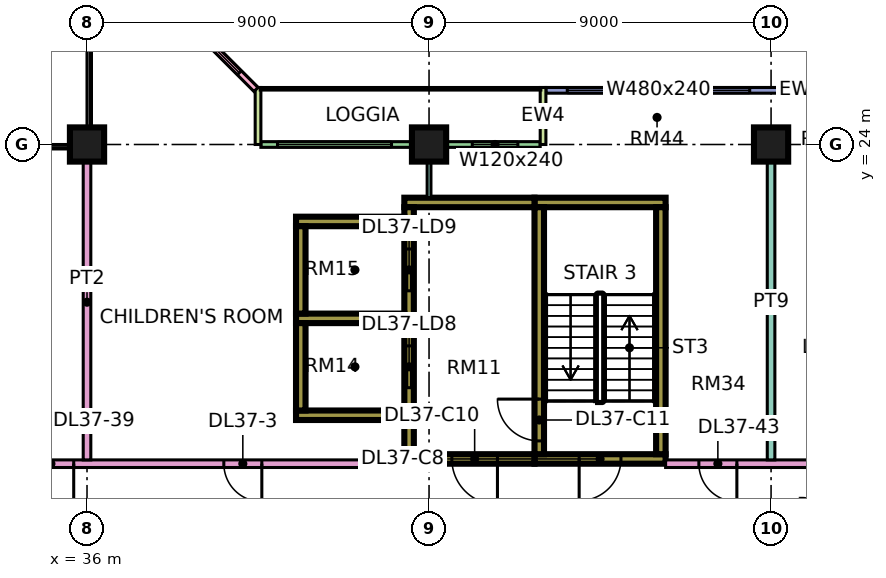
"""IFC4 building model, lengths in metres.
Left out: names, types, materials, properties, quantities, classifications, styles, units other than length and angle.
Written with IfcOpenShell. Run it as: python <this file> out.ifc"""

import sys

from ifc_helpers import new_model, si_unit, direction, frame, frame_2d, origin, origin_2d, place, context, subcontext, project, spatial, rectangle, extrude, element, fill, save


model = new_model("IFC4")
c1 = context("Model", 3, precision=1e-05, world=origin(), true_north=direction((0.0, 1.0)))
c2 = subcontext(c1, "Body", "Model", "MODEL_VIEW")
j1 = project(units=[si_unit("LENGTHUNIT", "METRE"), si_unit("PLANEANGLEUNIT", "RADIAN")], contexts=[c1])
p1 = place(None, origin())
s1 = spatial("IfcSite", under=j1, at=p1, CompositionType="ELEMENT")
p2 = place(p1, origin())
s2 = spatial("IfcBuilding", under=s1, at=p2, CompositionType="ELEMENT")
p3 = place(p2, frame((0.0, 0.0, 164.9)))
s3 = spatial("IfcBuildingStorey", under=s2, at=p3, CompositionType="ELEMENT", Elevation=164.9)
for number, where, z_axis, x_axis in (
    (1, (36.0, 24.0, 0.0), (0.0, 0.0, 1.0), (1.0, 0.0, 0.0)),
    (2, (45.0, 24.0, 0.0), (0.0, 0.0, 1.0), (1.0, 0.0, 0.0)),
    (3, (54.0, 24.0, 0.0), (0.0, 0.0, 1.0), (1.0, 0.0, 0.0)),
):
    element("IfcColumn", number, at=place(p3, frame(where, z_axis=z_axis, x_axis=x_axis)), inside=s3, PredefinedType="COLUMN", context=c2, shape_type="SweptSolid", body=[
        extrude(rectangle(XDim=0.9, YDim=0.9, at=origin_2d()), origin(), (0.0, 0.0, 1.0), 3.75),
    ])
p4 = place(p3, frame((47.775, 15.725, 0.0), z_axis=(0.0, 0.0, 1.0), x_axis=(1.0, 0.0, 0.0)))
e4 = element("IfcWall", 4, at=p4, inside=s3, PredefinedType="SHEAR", context=c2, shape_type="SweptSolid", body=[
    extrude(rectangle(XDim=3.45, YDim=0.25, at=frame_2d((1.725, 0.0))), origin(), (0.0, 0.0, 1.0), 3.75),
])
p5 = place(p4, frame((1.175, 0.0, 0.0)))
e5 = element("IfcOpeningElement", 5, at=p5, cuts=e4, PredefinedType="OPENING", context=c2, shape_type="SweptSolid", body=[
    extrude(rectangle(XDim=1.1, YDim=2.2, at=frame_2d((0.55, 1.1))), frame((0.0, 0.135, 0.0), z_axis=(0.0, -1.0, 0.0), x_axis=(1.0, 0.0, 0.0)), (0.0, 0.0, 1.0), 0.27),
])
p6 = place(p3, frame((47.775, 22.475, 0.0), z_axis=(0.0, 0.0, 1.0), x_axis=(1.0, 0.0, 0.0)))
e6 = element("IfcWall", 6, at=p6, inside=s3, PredefinedType="SHEAR", context=c2, shape_type="SweptSolid", body=[
    extrude(rectangle(XDim=3.45, YDim=0.25, at=frame_2d((1.725, 0.0))), origin(), (0.0, 0.0, 1.0), 3.75),
])
p7 = place(p3, frame((47.9, 15.85, 0.0), z_axis=(0.0, 0.0, 1.0), x_axis=(0.0, 1.0, 0.0)))
e7 = element("IfcWall", 7, at=p7, inside=s3, PredefinedType="SHEAR", context=c2, shape_type="SweptSolid", body=[
    extrude(rectangle(XDim=6.5, YDim=0.25, at=frame_2d((3.25, 0.0))), origin(), (0.0, 0.0, 1.0), 3.75),
])
p8 = place(p7, frame((0.35, 0.0, 0.0)))
e8 = element("IfcOpeningElement", 8, at=p8, cuts=e7, PredefinedType="OPENING", context=c2, shape_type="SweptSolid", body=[
    extrude(rectangle(XDim=1.1, YDim=2.2, at=frame_2d((0.55, 1.1))), frame((0.0, 0.135, 0.0), z_axis=(0.0, -1.0, 0.0), x_axis=(1.0, 0.0, 0.0)), (0.0, 0.0, 1.0), 0.27),
])
p9 = place(p3, frame((51.1, 15.85, 0.0), z_axis=(0.0, 0.0, 1.0), x_axis=(0.0, 1.0, 0.0)))
e9 = element("IfcWall", 9, at=p9, inside=s3, PredefinedType="SHEAR", context=c2, shape_type="SweptSolid", body=[
    extrude(rectangle(XDim=6.5, YDim=0.25, at=frame_2d((3.25, 0.0))), origin(), (0.0, 0.0, 1.0), 3.75),
])
p10 = place(p3, frame((44.35, 15.725, 0.0), z_axis=(0.0, 0.0, 1.0), x_axis=(1.0, 0.0, 0.0)))
e10 = element("IfcWall", 10, at=p10, inside=s3, PredefinedType="SHEAR", context=c2, shape_type="SweptSolid", body=[
    extrude(rectangle(XDim=3.425, YDim=0.25, at=frame_2d((1.712, 0.0))), origin(), (0.0, 0.0, 1.0), 3.75),
])
p11 = place(p10, frame((1.25, 0.0, 0.0)))
e11 = element("IfcOpeningElement", 11, at=p11, cuts=e10, PredefinedType="OPENING", context=c2, shape_type="SweptSolid", body=[
    extrude(rectangle(XDim=1.2, YDim=2.2, at=frame_2d((0.6, 1.1))), frame((0.0, 0.135, 0.0), z_axis=(0.0, -1.0, 0.0), x_axis=(1.0, 0.0, 0.0)), (0.0, 0.0, 1.0), 0.27),
])
p12 = place(p3, frame((44.35, 22.475, 0.0), z_axis=(0.0, 0.0, 1.0), x_axis=(1.0, 0.0, 0.0)))
e12 = element("IfcWall", 12, at=p12, inside=s3, PredefinedType="SHEAR", context=c2, shape_type="SweptSolid", body=[
    extrude(rectangle(XDim=3.425, YDim=0.25, at=frame_2d((1.712, 0.0))), origin(), (0.0, 0.0, 1.0), 3.75),
])
p13 = place(p3, frame((44.475, 15.85, 0.0), z_axis=(0.0, 0.0, 1.0), x_axis=(0.0, 1.0, 0.0)))
e13 = element("IfcWall", 13, at=p13, inside=s3, PredefinedType="SHEAR", context=c2, shape_type="SweptSolid", body=[
    extrude(rectangle(XDim=6.5, YDim=0.25, at=frame_2d((3.25, 0.0))), origin(), (0.0, 0.0, 1.0), 3.75),
])
p14 = place(p13, frame((1.75, 0.0, 0.0)))
e14 = element("IfcOpeningElement", 14, at=p14, cuts=e13, PredefinedType="OPENING", context=c2, shape_type="SweptSolid", body=[
    extrude(rectangle(XDim=1.1, YDim=2.2, at=frame_2d((0.55, 1.1))), frame((0.0, 0.135, 0.0), z_axis=(0.0, -1.0, 0.0), x_axis=(1.0, 0.0, 0.0)), (0.0, 0.0, 1.0), 0.27),
])
p15 = place(p13, frame((4.3, 0.0, 0.0)))
e15 = element("IfcOpeningElement", 15, at=p15, cuts=e13, PredefinedType="OPENING", context=c2, shape_type="SweptSolid", body=[
    extrude(rectangle(XDim=1.1, YDim=2.2, at=frame_2d((0.55, 1.1))), frame((0.0, 0.135, 0.0), z_axis=(0.0, -1.0, 0.0), x_axis=(1.0, 0.0, 0.0)), (0.0, 0.0, 1.0), 0.27),
])
for number, where, z_axis, x_axis in (
    (16, (41.5, 16.875, 0.0), (0.0, 0.0, 1.0), (1.0, 0.0, 0.0)),
    (17, (41.5, 19.425, 0.0), (0.0, 0.0, 1.0), (1.0, 0.0, 0.0)),
    (18, (41.5, 21.975, 0.0), (0.0, 0.0, 1.0), (1.0, 0.0, 0.0)),
):
    element("IfcWall", number, at=place(p3, frame(where, z_axis=z_axis, x_axis=x_axis)), inside=s3, PredefinedType="SHEAR", context=c2, shape_type="SweptSolid", body=[
        extrude(rectangle(XDim=2.85, YDim=0.25, at=frame_2d((1.425, 0.0))), origin(), (0.0, 0.0, 1.0), 3.75),
    ])
for number, where, z_axis, x_axis in (
    (19, (41.625, 17.0, 0.0), (0.0, 0.0, 1.0), (0.0, 1.0, 0.0)),
    (20, (41.625, 19.55, 0.0), (0.0, 0.0, 1.0), (0.0, 1.0, 0.0)),
):
    element("IfcWall", number, at=place(p3, frame(where, z_axis=z_axis, x_axis=x_axis)), inside=s3, PredefinedType="SHEAR", context=c2, shape_type="SweptSolid", body=[
        extrude(rectangle(XDim=2.3, YDim=0.25, at=frame_2d((1.15, 0.0))), origin(), (0.0, 0.0, 1.0), 3.75),
    ])
p16 = place(p3, frame((61.5, 25.425, 0.0), z_axis=(0.0, 0.0, 1.0), x_axis=(-1.0, 0.0, 0.0)))
e21 = element("IfcWall", 21, at=p16, inside=s3, PredefinedType="SOLIDWALL", context=c2, shape_type="SweptSolid", body=[
    extrude(rectangle(XDim=13.425, YDim=0.15, at=frame_2d((6.712, 0.0))), origin(), (0.0, 0.0, 1.0), 3.35),
])
p17 = place(p16, frame((0.3, 0.0, 0.45)))
e22 = element("IfcOpeningElement", 22, at=p17, cuts=e21, PredefinedType="OPENING", context=c2, shape_type="SweptSolid", body=[
    extrude(rectangle(XDim=0.9, YDim=2.4, at=frame_2d((0.45, 1.2))), frame((0.0, 0.085, 0.0), z_axis=(0.0, -1.0, 0.0), x_axis=(1.0, 0.0, 0.0)), (0.0, 0.0, 1.0), 0.17),
])
p18 = place(p16, frame((2.1, 0.0, 0.45)))
e23 = element("IfcOpeningElement", 23, at=p18, cuts=e21, PredefinedType="OPENING", context=c2, shape_type="SweptSolid", body=[
    extrude(rectangle(XDim=1.8, YDim=2.4, at=frame_2d((0.9, 1.2))), frame((0.0, 0.085, 0.0), z_axis=(0.0, -1.0, 0.0), x_axis=(1.0, 0.0, 0.0)), (0.0, 0.0, 1.0), 0.17),
])
p19 = place(p16, frame((5.1, 0.0, 0.45)))
e24 = element("IfcOpeningElement", 24, at=p19, cuts=e21, PredefinedType="OPENING", context=c2, shape_type="SweptSolid", body=[
    extrude(rectangle(XDim=1.8, YDim=2.4, at=frame_2d((0.9, 1.2))), frame((0.0, 0.085, 0.0), z_axis=(0.0, -1.0, 0.0), x_axis=(1.0, 0.0, 0.0)), (0.0, 0.0, 1.0), 0.17),
])
p20 = place(p16, frame((8.062, 0.0, 0.45)))
e25 = element("IfcOpeningElement", 25, at=p20, cuts=e21, PredefinedType="OPENING", context=c2, shape_type="SweptSolid", body=[
    extrude(rectangle(XDim=4.8, YDim=2.4, at=frame_2d((2.4, 1.2))), frame((0.0, 0.085, 0.0), z_axis=(0.0, -1.0, 0.0), x_axis=(1.0, 0.0, 0.0)), (0.0, 0.0, 1.0), 0.17),
])
p21 = place(p3, frame((47.925, 24.0, 0.0), z_axis=(0.0, 0.0, 1.0), x_axis=(-1.0, 0.0, 0.0)))
e26 = element("IfcWall", 26, at=p21, inside=s3, PredefinedType="SOLIDWALL", context=c2, shape_type="SweptSolid", body=[
    extrude(rectangle(XDim=7.35, YDim=0.15, at=frame_2d((3.675, 0.0))), origin(), (0.0, 0.0, 1.0), 3.35),
])
p22 = place(p21, frame((0.587, 0.0, 0.45)))
e27 = element("IfcOpeningElement", 27, at=p22, cuts=e26, PredefinedType="OPENING", context=c2, shape_type="SweptSolid", body=[
    extrude(rectangle(XDim=1.2, YDim=2.4, at=frame_2d((0.6, 1.2))), frame((0.0, 0.085, 0.0), z_axis=(0.0, -1.0, 0.0), x_axis=(1.0, 0.0, 0.0)), (0.0, 0.0, 1.0), 0.17),
])
p23 = place(p21, frame((3.913, 0.0, 0.45)))
e28 = element("IfcOpeningElement", 28, at=p23, cuts=e26, PredefinedType="OPENING", context=c2, shape_type="SweptSolid", body=[
    extrude(rectangle(XDim=3.0, YDim=2.4, at=frame_2d((1.5, 1.2))), frame((0.0, 0.085, 0.0), z_axis=(0.0, -1.0, 0.0), x_axis=(1.0, 0.0, 0.0)), (0.0, 0.0, 1.0), 0.17),
])
for number, where, z_axis, x_axis in (
    (29, (48.0, 25.5, 0.0), (0.0, 0.0, 1.0), (0.0, -1.0, 0.0)),
    (30, (40.5, 25.5, 0.0), (0.0, 0.0, 1.0), (0.0, -1.0, 0.0)),
):
    element("IfcWall", number, at=place(p3, frame(where, z_axis=z_axis, x_axis=x_axis)), inside=s3, PredefinedType="SOLIDWALL", context=c2, shape_type="SweptSolid", body=[
        extrude(rectangle(XDim=1.5, YDim=0.15, at=frame_2d((0.75, 0.0))), origin(), (0.0, 0.0, 1.0), 3.35),
    ])
p24 = place(p3, frame((40.447, 25.447, 0.0), z_axis=(0.0, 0.0, 1.0), x_axis=(-0.707106781187, 0.707106781187, 0.0)))
e31 = element("IfcWall", 31, at=p24, inside=s3, PredefinedType="SOLIDWALL", context=c2, shape_type="SweptSolid", body=[
    extrude(rectangle(XDim=4.243, YDim=0.15, at=frame_2d((2.121, 0.0))), origin(), (0.0, 0.0, 1.0), 3.35),
])
p25 = place(p24, frame((0.621, 0.0, 0.45)))
e32 = element("IfcOpeningElement", 32, at=p25, cuts=e31, PredefinedType="OPENING", context=c2, shape_type="SweptSolid", body=[
    extrude(rectangle(XDim=3.0, YDim=2.4, at=frame_2d((1.5, 1.2))), frame((0.0, 0.085, 0.0), z_axis=(0.0, -1.0, 0.0), x_axis=(1.0, 0.0, 0.0)), (0.0, 0.0, 1.0), 0.17),
])
p26 = place(p3, frame((34.0, 15.6, 0.0), z_axis=(0.0, 0.0, 1.0), x_axis=(1.0, 0.0, 0.0)))
e33 = element("IfcWall", 33, at=p26, inside=s3, PredefinedType="PARTITIONING", context=c2, shape_type="SweptSolid", body=[
    extrude(rectangle(XDim=10.35, YDim=0.2, at=frame_2d((5.175, 0.0))), origin(), (0.0, 0.0, 1.0), 3.35),
])
p27 = place(p26, frame((5.6, 0.0, 0.0)))
e34 = element("IfcOpeningElement", 34, at=p27, cuts=e33, PredefinedType="OPENING", context=c2, shape_type="SweptSolid", body=[
    extrude(rectangle(XDim=1.0, YDim=2.1, at=frame_2d((0.5, 1.05))), frame((0.0, 0.11, 0.0), z_axis=(0.0, -1.0, 0.0), x_axis=(1.0, 0.0, 0.0)), (0.0, 0.0, 1.0), 0.22),
])
p28 = place(p26, frame((0.45, 0.0, 0.0)))
e35 = element("IfcOpeningElement", 35, at=p28, cuts=e33, PredefinedType="OPENING", context=c2, shape_type="SweptSolid", body=[
    extrude(rectangle(XDim=1.2, YDim=2.1, at=frame_2d((0.6, 1.05))), frame((0.0, 0.11, 0.0), z_axis=(0.0, -1.0, 0.0), x_axis=(1.0, 0.0, 0.0)), (0.0, 0.0, 1.0), 0.22),
])
p29 = place(p3, frame((36.0, 15.7, 0.0), z_axis=(0.0, 0.0, 1.0), x_axis=(0.0, 1.0, 0.0)))
e36 = element("IfcWall", 36, at=p29, inside=s3, PredefinedType="PARTITIONING", context=c2, shape_type="SweptSolid", body=[
    extrude(rectangle(XDim=8.3, YDim=0.2, at=frame_2d((4.15, 0.0))), origin(), (0.0, 0.0, 1.0), 3.35),
])
p30 = place(p3, frame((45.0, 22.6, 0.0), z_axis=(0.0, 0.0, 1.0), x_axis=(0.0, 1.0, 0.0)))
e37 = element("IfcWall", 37, at=p30, inside=s3, PredefinedType="PARTITIONING", context=c2, shape_type="SweptSolid", body=[
    extrude(rectangle(XDim=1.326, YDim=0.1, at=frame_2d((0.663, 0.0))), origin(), (0.0, 0.0, 1.0), 3.35),
])
p31 = place(p3, frame((51.225, 15.6, 0.0), z_axis=(0.0, 0.0, 1.0), x_axis=(1.0, 0.0, 0.0)))
e38 = element("IfcWall", 38, at=p31, inside=s3, PredefinedType="PARTITIONING", context=c2, shape_type="SweptSolid", body=[
    extrude(rectangle(XDim=11.701, YDim=0.2, at=frame_2d((5.851, 0.0))), origin(), (0.0, 0.0, 1.0), 3.35),
])
p32 = place(p31, frame((3.875, 0.0, 0.0)))
e39 = element("IfcOpeningElement", 39, at=p32, cuts=e38, PredefinedType="OPENING", context=c2, shape_type="SweptSolid", body=[
    extrude(rectangle(XDim=1.0, YDim=2.1, at=frame_2d((0.5, 1.05))), frame((0.0, 0.11, 0.0), z_axis=(0.0, -1.0, 0.0), x_axis=(1.0, 0.0, 0.0)), (0.0, 0.0, 1.0), 0.22),
])
p33 = place(p31, frame((0.875, 0.0, 0.0)))
e40 = element("IfcOpeningElement", 40, at=p33, cuts=e38, PredefinedType="OPENING", context=c2, shape_type="SweptSolid", body=[
    extrude(rectangle(XDim=1.0, YDim=2.1, at=frame_2d((0.5, 1.05))), frame((0.0, 0.11, 0.0), z_axis=(0.0, -1.0, 0.0), x_axis=(1.0, 0.0, 0.0)), (0.0, 0.0, 1.0), 0.22),
])
p34 = place(p3, frame((54.0, 15.7, 0.0), z_axis=(0.0, 0.0, 1.0), x_axis=(0.0, 1.0, 0.0)))
e41 = element("IfcWall", 41, at=p34, inside=s3, PredefinedType="PARTITIONING", context=c2, shape_type="SweptSolid", body=[
    extrude(rectangle(XDim=8.3, YDim=0.2, at=frame_2d((4.15, 0.0))), origin(), (0.0, 0.0, 1.0), 3.35),
])
p35 = place(p19, origin())
e42 = element("IfcWindow", 42, at=p35, inside=s3, PartitioningType="SINGLE_PANEL", PredefinedType="WINDOW", context=c2, shape_type="SweptSolid", body=[
    extrude(rectangle(XDim=1.8, YDim=2.4, at=frame_2d((0.9, 1.2))), frame((0.0, 0.03, 0.0), z_axis=(0.0, -1.0, 0.0), x_axis=(1.0, 0.0, 0.0)), (0.0, 0.0, 1.0), 0.06),
])
fill(e24, e42)
p36 = place(p20, origin())
e43 = element("IfcWindow", 43, at=p36, inside=s3, PartitioningType="SINGLE_PANEL", PredefinedType="WINDOW", context=c2, shape_type="SweptSolid", body=[
    extrude(rectangle(XDim=4.8, YDim=2.4, at=frame_2d((2.4, 1.2))), frame((0.0, 0.03, 0.0), z_axis=(0.0, -1.0, 0.0), x_axis=(1.0, 0.0, 0.0)), (0.0, 0.0, 1.0), 0.06),
])
fill(e25, e43)
p37 = place(p22, origin())
e44 = element("IfcWindow", 44, at=p37, inside=s3, PartitioningType="SINGLE_PANEL", PredefinedType="WINDOW", context=c2, shape_type="SweptSolid", body=[
    extrude(rectangle(XDim=1.2, YDim=2.4, at=frame_2d((0.6, 1.2))), frame((0.0, 0.03, 0.0), z_axis=(0.0, -1.0, 0.0), x_axis=(1.0, 0.0, 0.0)), (0.0, 0.0, 1.0), 0.06),
])
fill(e27, e44)
p38 = place(p23, origin())
e45 = element("IfcWindow", 45, at=p38, inside=s3, PartitioningType="SINGLE_PANEL", PredefinedType="WINDOW", context=c2, shape_type="SweptSolid", body=[
    extrude(rectangle(XDim=3.0, YDim=2.4, at=frame_2d((1.5, 1.2))), frame((0.0, 0.03, 0.0), z_axis=(0.0, -1.0, 0.0), x_axis=(1.0, 0.0, 0.0)), (0.0, 0.0, 1.0), 0.06),
])
fill(e28, e45)
p39 = place(p25, origin())
e46 = element("IfcWindow", 46, at=p39, inside=s3, PartitioningType="SINGLE_PANEL", PredefinedType="WINDOW", context=c2, shape_type="SweptSolid", body=[
    extrude(rectangle(XDim=3.0, YDim=2.4, at=frame_2d((1.5, 1.2))), frame((0.0, 0.03, 0.0), z_axis=(0.0, -1.0, 0.0), x_axis=(1.0, 0.0, 0.0)), (0.0, 0.0, 1.0), 0.06),
])
fill(e32, e46)
p40 = place(p5, frame((1.1, 0.0, 0.0), z_axis=(0.0, 0.0, 1.0), x_axis=(-1.0, 0.0, 0.0)))
e47 = element("IfcDoor", 47, at=p40, inside=s3, OperationType="SINGLE_SWING_LEFT", PredefinedType="DOOR", context=c2, shape_type="SweptSolid", body=[
    extrude(rectangle(XDim=1.1, YDim=2.2, at=frame_2d((0.55, 1.1))), frame((0.0, 0.025, 0.0), z_axis=(0.0, -1.0, 0.0), x_axis=(1.0, 0.0, 0.0)), (0.0, 0.0, 1.0), 0.05),
])
fill(e5, e47)
p41 = place(p11, origin())
e48 = element("IfcDoor", 48, at=p41, inside=s3, OperationType="SINGLE_SWING_RIGHT", PredefinedType="DOOR", context=c2, shape_type="SweptSolid", body=[
    extrude(rectangle(XDim=1.2, YDim=2.2, at=frame_2d((0.6, 1.1))), frame((0.0, 0.025, 0.0), z_axis=(0.0, -1.0, 0.0), x_axis=(1.0, 0.0, 0.0)), (0.0, 0.0, 1.0), 0.05),
])
fill(e11, e48)
p42 = place(p8, frame((1.1, 0.0, 0.0), z_axis=(0.0, 0.0, 1.0), x_axis=(-1.0, 0.0, 0.0)))
e49 = element("IfcDoor", 49, at=p42, inside=s3, OperationType="SINGLE_SWING_RIGHT", PredefinedType="DOOR", context=c2, shape_type="SweptSolid", body=[
    extrude(rectangle(XDim=1.1, YDim=2.2, at=frame_2d((0.55, 1.1))), frame((0.0, 0.025, 0.0), z_axis=(0.0, -1.0, 0.0), x_axis=(1.0, 0.0, 0.0)), (0.0, 0.0, 1.0), 0.05),
])
fill(e8, e49)
p43 = place(p14, origin())
e50 = element("IfcDoor", 50, at=p43, inside=s3, OperationType="DOUBLE_DOOR_SLIDING", PredefinedType="DOOR", context=c2, shape_type="SweptSolid", body=[
    extrude(rectangle(XDim=1.1, YDim=2.2, at=frame_2d((0.55, 1.1))), frame((0.0, 0.025, 0.0), z_axis=(0.0, -1.0, 0.0), x_axis=(1.0, 0.0, 0.0)), (0.0, 0.0, 1.0), 0.05),
])
fill(e14, e50)
p44 = place(p15, origin())
e51 = element("IfcDoor", 51, at=p44, inside=s3, OperationType="DOUBLE_DOOR_SLIDING", PredefinedType="DOOR", context=c2, shape_type="SweptSolid", body=[
    extrude(rectangle(XDim=1.1, YDim=2.2, at=frame_2d((0.55, 1.1))), frame((0.0, 0.025, 0.0), z_axis=(0.0, -1.0, 0.0), x_axis=(1.0, 0.0, 0.0)), (0.0, 0.0, 1.0), 0.05),
])
fill(e15, e51)
p45 = place(p27, origin())
e52 = element("IfcDoor", 52, at=p45, inside=s3, OperationType="SINGLE_SWING_RIGHT", PredefinedType="DOOR", context=c2, shape_type="SweptSolid", body=[
    extrude(rectangle(XDim=1.0, YDim=2.1, at=frame_2d((0.5, 1.05))), frame((0.0, 0.025, 0.0), z_axis=(0.0, -1.0, 0.0), x_axis=(1.0, 0.0, 0.0)), (0.0, 0.0, 1.0), 0.05),
])
fill(e34, e52)
p46 = place(p28, origin())
e53 = element("IfcDoor", 53, at=p46, inside=s3, OperationType="SINGLE_SWING_RIGHT", PredefinedType="DOOR", context=c2, shape_type="SweptSolid", body=[
    extrude(rectangle(XDim=1.2, YDim=2.1, at=frame_2d((0.6, 1.05))), frame((0.0, 0.025, 0.0), z_axis=(0.0, -1.0, 0.0), x_axis=(1.0, 0.0, 0.0)), (0.0, 0.0, 1.0), 0.05),
])
fill(e35, e53)
p47 = place(p33, origin())
e54 = element("IfcDoor", 54, at=p47, inside=s3, OperationType="SINGLE_SWING_RIGHT", PredefinedType="DOOR", context=c2, shape_type="SweptSolid", body=[
    extrude(rectangle(XDim=1.0, YDim=2.1, at=frame_2d((0.5, 1.05))), frame((0.0, 0.025, 0.0), z_axis=(0.0, -1.0, 0.0), x_axis=(1.0, 0.0, 0.0)), (0.0, 0.0, 1.0), 0.05),
])
fill(e40, e54)
save(model, sys.argv[1])
